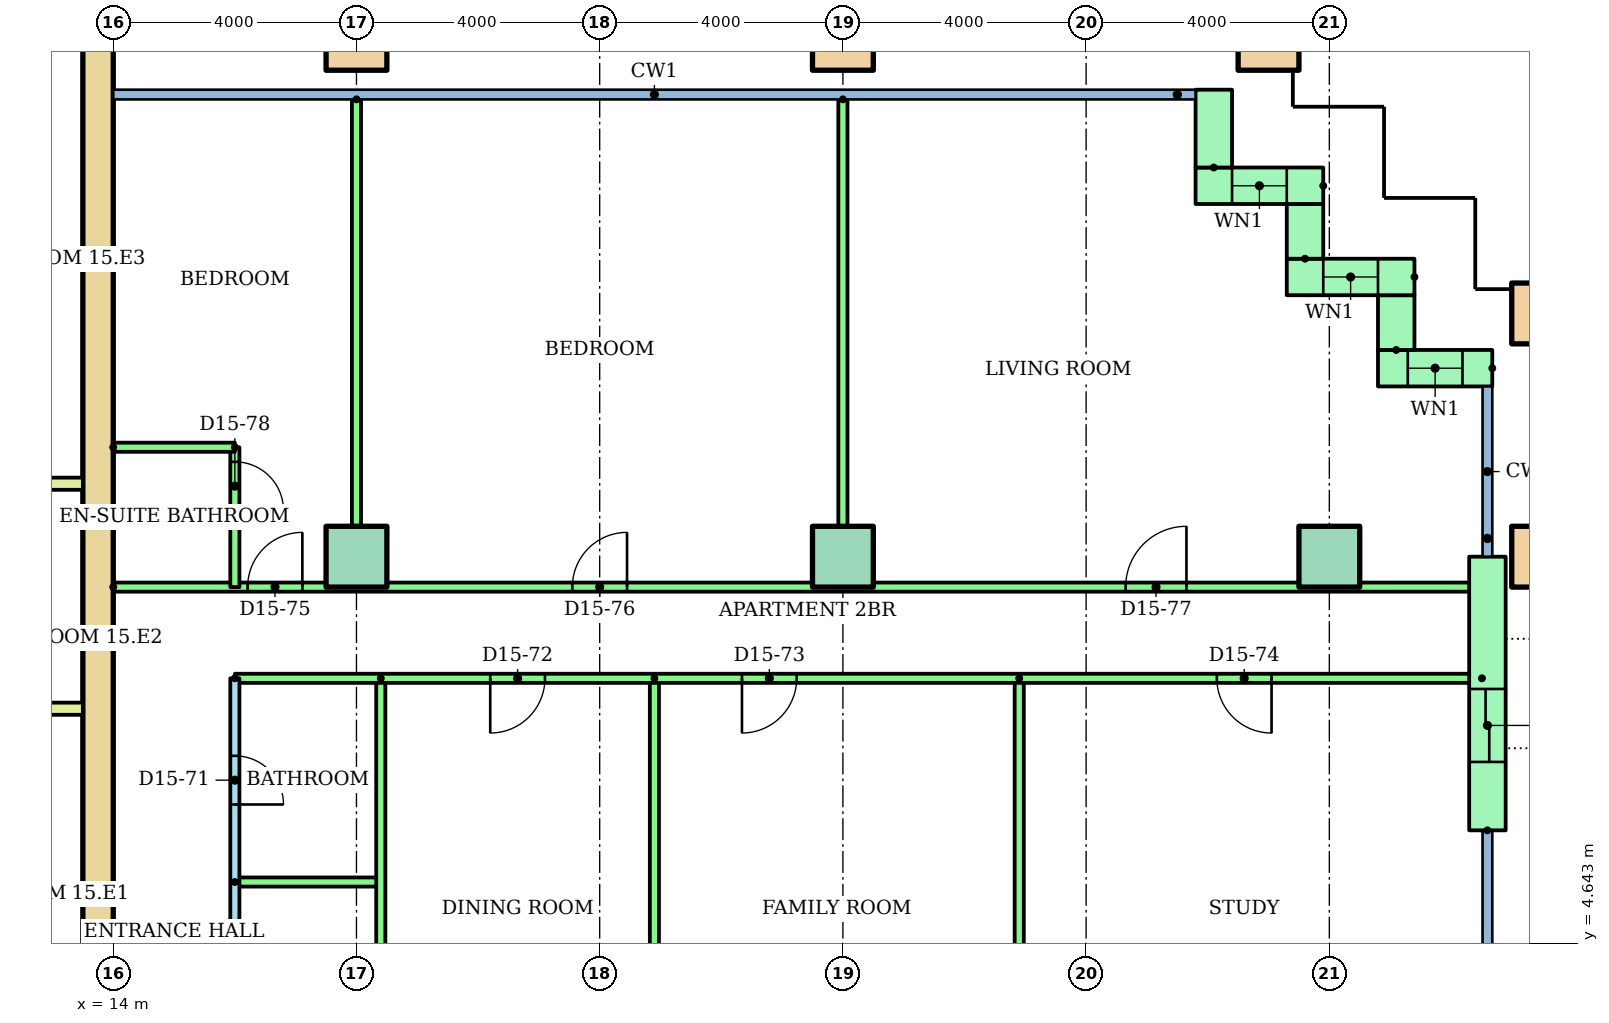
"""IFC4 building model, lengths in metres.
Left out: names, types, materials, properties, quantities, classifications, styles, units other than length and angle.
Written with IfcOpenShell. Run it as: python <this file> out.ifc"""

import sys

from ifc_helpers import new_model, si_unit, direction, frame, frame_2d, origin, origin_2d, place, context, subcontext, project, spatial, rectangle, hollow_rectangle, extrude, element, fill, save


model = new_model("IFC4")
c1 = context("Model", 3, precision=1e-05, world=origin(), true_north=direction((0.0, 1.0)))
c2 = subcontext(c1, "Body", "Model", "MODEL_VIEW")
j1 = project(units=[si_unit("LENGTHUNIT", "METRE"), si_unit("PLANEANGLEUNIT", "RADIAN")], contexts=[c1])
p1 = place(None, origin())
s1 = spatial("IfcSite", under=j1, at=p1, CompositionType="ELEMENT")
p2 = place(p1, origin())
s2 = spatial("IfcBuilding", under=s1, at=p2, CompositionType="ELEMENT")
p3 = place(p2, frame((0.0, 0.0, 57.6)))
s3 = spatial("IfcBuildingStorey", under=s2, at=p3, CompositionType="ELEMENT", Elevation=57.6)
for number, where in (
    (1, (18.0, 11.0, 0.0)),
    (2, (26.0, 11.0, 0.0)),
    (3, (34.0, 11.0, 0.0)),
):
    element("IfcColumn", number, at=place(p3, frame(where)), inside=s3, PredefinedType="COLUMN", context=c2, shape_type="SweptSolid", body=[
        extrude(rectangle(XDim=1.0, YDim=1.0, at=origin_2d()), origin(), (0.0, 0.0, 1.0), 3.2),
    ])
for number, where in (
    (4, (37.5, 11.0, 0.0)),
    (5, (37.5, 15.0, 0.0)),
    (6, (18.0, 19.5, 0.0)),
    (7, (26.0, 19.5, 0.0)),
    (8, (33.0, 19.5, 0.0)),
):
    element("IfcColumn", number, at=place(p3, frame(where)), inside=s3, PredefinedType="COLUMN", context=c2, shape_type="SweptSolid", body=[
        extrude(hollow_rectangle(XDim=1.0, YDim=1.0, WallThickness=0.05, at=origin_2d()), origin(), (0.0, 0.0, 1.0), 3.2),
    ])
p4 = place(p3, frame((36.68, 14.1, 0.0), z_axis=(0.0, 0.0, 1.0), x_axis=(-1.0, 0.0, 0.0)))
e9 = element("IfcWall", 9, at=p4, inside=s3, PredefinedType="STANDARD", context=c2, shape_type="SweptSolid", body=[
    extrude(rectangle(XDim=1.88, YDim=0.6, at=frame_2d((0.94, 0.0))), origin(), (0.0, 0.0, 1.0), 2.92),
])
p5 = place(p4, frame((0.49, 0.0, 0.9)))
e10 = element("IfcOpeningElement", 10, at=p5, cuts=e9, PredefinedType="OPENING", context=c2, shape_type="SweptSolid", body=[
    extrude(rectangle(XDim=0.9, YDim=1.5, at=frame_2d((0.45, 0.75))), frame((0.0, 0.31, 0.0), z_axis=(0.0, -1.0, 0.0), x_axis=(1.0, 0.0, 0.0)), (0.0, 0.0, 1.0), 0.62),
])
p6 = place(p3, frame((35.1, 14.4, 0.0), z_axis=(0.0, 0.0, 1.0), x_axis=(0.0, 1.0, 0.0)))
e11 = element("IfcWall", 11, at=p6, inside=s3, PredefinedType="STANDARD", context=c2, shape_type="SweptSolid", body=[
    extrude(rectangle(XDim=0.9, YDim=0.6, at=frame_2d((0.45, 0.0))), origin(), (0.0, 0.0, 1.0), 2.92),
])
p7 = place(p3, frame((35.4, 15.6, 0.0), z_axis=(0.0, 0.0, 1.0), x_axis=(-1.0, 0.0, 0.0)))
e12 = element("IfcWall", 12, at=p7, inside=s3, PredefinedType="STANDARD", context=c2, shape_type="SweptSolid", body=[
    extrude(rectangle(XDim=2.1, YDim=0.6, at=frame_2d((1.05, 0.0))), origin(), (0.0, 0.0, 1.0), 2.92),
])
p8 = place(p7, frame((0.6, 0.0, 0.9)))
e13 = element("IfcOpeningElement", 13, at=p8, cuts=e12, PredefinedType="OPENING", context=c2, shape_type="SweptSolid", body=[
    extrude(rectangle(XDim=0.9, YDim=1.5, at=frame_2d((0.45, 0.75))), frame((0.0, 0.31, 0.0), z_axis=(0.0, -1.0, 0.0), x_axis=(1.0, 0.0, 0.0)), (0.0, 0.0, 1.0), 0.62),
])
p9 = place(p3, frame((33.6, 15.9, 0.0), z_axis=(0.0, 0.0, 1.0), x_axis=(0.0, 1.0, 0.0)))
e14 = element("IfcWall", 14, at=p9, inside=s3, PredefinedType="STANDARD", context=c2, shape_type="SweptSolid", body=[
    extrude(rectangle(XDim=0.9, YDim=0.6, at=frame_2d((0.45, 0.0))), origin(), (0.0, 0.0, 1.0), 2.92),
])
p10 = place(p3, frame((33.9, 17.1, 0.0), z_axis=(0.0, 0.0, 1.0), x_axis=(-1.0, 0.0, 0.0)))
e15 = element("IfcWall", 15, at=p10, inside=s3, PredefinedType="STANDARD", context=c2, shape_type="SweptSolid", body=[
    extrude(rectangle(XDim=2.1, YDim=0.6, at=frame_2d((1.05, 0.0))), origin(), (0.0, 0.0, 1.0), 2.92),
])
p11 = place(p10, frame((0.6, 0.0, 0.9)))
e16 = element("IfcOpeningElement", 16, at=p11, cuts=e15, PredefinedType="OPENING", context=c2, shape_type="SweptSolid", body=[
    extrude(rectangle(XDim=0.9, YDim=1.5, at=frame_2d((0.45, 0.75))), frame((0.0, 0.31, 0.0), z_axis=(0.0, -1.0, 0.0), x_axis=(1.0, 0.0, 0.0)), (0.0, 0.0, 1.0), 0.62),
])
p12 = place(p3, frame((32.1, 17.4, 0.0), z_axis=(0.0, 0.0, 1.0), x_axis=(0.0, 1.0, 0.0)))
e17 = element("IfcWall", 17, at=p12, inside=s3, PredefinedType="STANDARD", context=c2, shape_type="SweptSolid", body=[
    extrude(rectangle(XDim=1.28, YDim=0.6, at=frame_2d((0.64, 0.0))), origin(), (0.0, 0.0, 1.0), 2.92),
])
p13 = place(p3, frame((36.6, 6.5, 0.0), z_axis=(0.0, 0.0, 1.0), x_axis=(0.0, 1.0, 0.0)))
e18 = element("IfcWall", 18, at=p13, inside=s3, PredefinedType="STANDARD", context=c2, shape_type="SweptSolid", body=[
    extrude(rectangle(XDim=4.5, YDim=0.6, at=frame_2d((2.25, 0.0))), origin(), (0.0, 0.0, 1.0), 2.92),
])
p14 = place(p13, frame((1.125, 0.0, 0.0)))
e19 = element("IfcOpeningElement", 19, at=p14, cuts=e18, PredefinedType="OPENING", context=c2, shape_type="SweptSolid", body=[
    extrude(rectangle(XDim=1.2, YDim=2.1, at=frame_2d((0.6, 1.05))), frame((0.0, 0.31, 0.0), z_axis=(0.0, -1.0, 0.0), x_axis=(1.0, 0.0, 0.0)), (0.0, 0.0, 1.0), 0.62),
])
p15 = place(p3, frame((13.75, 3.0, 0.0), z_axis=(0.0, 0.0, 1.0), x_axis=(0.0, 1.0, 0.0)))
e20 = element("IfcWall", 20, at=p15, inside=s3, PredefinedType="SHEAR", context=c2, shape_type="SweptSolid", body=[
    extrude(rectangle(XDim=17.0, YDim=0.5, at=frame_2d((8.5, 0.0))), origin(), (0.0, 0.0, 1.0), 2.92),
])
for number, where in (
    (21, (9.6, 8.5, 0.0)),
    (22, (9.6, 12.2, 0.0)),
):
    element("IfcWall", number, at=place(p3, frame(where)), inside=s3, PredefinedType="PARTITIONING", context=c2, shape_type="SweptSolid", body=[
        extrude(rectangle(XDim=3.9, YDim=0.2, at=frame_2d((1.95, 0.0))), origin(), (0.0, 0.0, 1.0), 2.92),
    ])
p16 = place(p3, frame((16.0, 9.0, 0.0), z_axis=(0.0, 0.0, 1.0), x_axis=(0.0, -1.0, 0.0)))
e23 = element("IfcWall", 23, at=p16, inside=s3, PredefinedType="PARTITIONING", context=c2, shape_type="SweptSolid", body=[
    extrude(rectangle(XDim=7.6, YDim=0.15, at=frame_2d((3.8, 0.0))), origin(), (0.0, 0.0, 1.0), 2.4),
])
p17 = place(p16, frame((5.025, 0.0, 0.0)))
e24 = element("IfcOpeningElement", 24, at=p17, cuts=e23, PredefinedType="OPENING", context=c2, shape_type="SweptSolid", body=[
    extrude(rectangle(XDim=0.9, YDim=2.1, at=frame_2d((0.45, 1.05))), frame((0.0, 0.085, 0.0), z_axis=(0.0, -1.0, 0.0), x_axis=(1.0, 0.0, 0.0)), (0.0, 0.0, 1.0), 0.17),
])
p18 = place(p16, frame((1.275, 0.0, 0.0)))
e25 = element("IfcOpeningElement", 25, at=p18, cuts=e23, PredefinedType="OPENING", context=c2, shape_type="SweptSolid", body=[
    extrude(rectangle(XDim=0.8, YDim=2.1, at=frame_2d((0.4, 1.05))), frame((0.0, 0.085, 0.0), z_axis=(0.0, -1.0, 0.0), x_axis=(1.0, 0.0, 0.0)), (0.0, 0.0, 1.0), 0.17),
])
p19 = place(p3, frame((16.0, 5.65, 0.0)))
e26 = element("IfcWall", 26, at=p19, inside=s3, PredefinedType="PARTITIONING", context=c2, shape_type="SweptSolid", body=[
    extrude(rectangle(XDim=2.4, YDim=0.15, at=frame_2d((1.2, 0.0))), origin(), (0.0, 0.0, 1.0), 2.4),
])
for number, where, z_axis, x_axis in (
    (27, (18.4, 9.0, 0.0), (0.0, 0.0, 1.0), (0.0, -1.0, 0.0)),
    (28, (22.9, 9.0, 0.0), (0.0, 0.0, 1.0), (0.0, -1.0, 0.0)),
    (29, (28.9, 9.0, 0.0), (0.0, 0.0, 1.0), (0.0, -1.0, 0.0)),
):
    element("IfcWall", number, at=place(p3, frame(where, z_axis=z_axis, x_axis=x_axis)), inside=s3, PredefinedType="PARTITIONING", context=c2, shape_type="SweptSolid", body=[
        extrude(rectangle(XDim=7.6, YDim=0.15, at=frame_2d((3.8, 0.0))), origin(), (0.0, 0.0, 1.0), 2.4),
    ])
p20 = place(p3, frame((36.51, 9.0, 0.0), z_axis=(0.0, 0.0, 1.0), x_axis=(-1.0, 0.0, 0.0)))
e30 = element("IfcWall", 30, at=p20, inside=s3, PredefinedType="PARTITIONING", context=c2, shape_type="SweptSolid", body=[
    extrude(rectangle(XDim=20.51, YDim=0.15, at=frame_2d((10.255, 0.0))), origin(), (0.0, 0.0, 1.0), 2.4),
])
p21 = place(p20, frame((15.41, 0.0, 0.0)))
e31 = element("IfcOpeningElement", 31, at=p21, cuts=e30, PredefinedType="OPENING", context=c2, shape_type="SweptSolid", body=[
    extrude(rectangle(XDim=0.9, YDim=2.1, at=frame_2d((0.45, 1.05))), frame((0.0, 0.085, 0.0), z_axis=(0.0, -1.0, 0.0), x_axis=(1.0, 0.0, 0.0)), (0.0, 0.0, 1.0), 0.17),
])
p22 = place(p20, frame((11.27, 0.0, 0.0)))
e32 = element("IfcOpeningElement", 32, at=p22, cuts=e30, PredefinedType="OPENING", context=c2, shape_type="SweptSolid", body=[
    extrude(rectangle(XDim=0.9, YDim=2.1, at=frame_2d((0.45, 1.05))), frame((0.0, 0.085, 0.0), z_axis=(0.0, -1.0, 0.0), x_axis=(1.0, 0.0, 0.0)), (0.0, 0.0, 1.0), 0.17),
])
p23 = place(p20, frame((3.46, 0.0, 0.0)))
e33 = element("IfcOpeningElement", 33, at=p23, cuts=e30, PredefinedType="OPENING", context=c2, shape_type="SweptSolid", body=[
    extrude(rectangle(XDim=0.9, YDim=2.1, at=frame_2d((0.45, 1.05))), frame((0.0, 0.085, 0.0), z_axis=(0.0, -1.0, 0.0), x_axis=(1.0, 0.0, 0.0)), (0.0, 0.0, 1.0), 0.17),
])
p24 = place(p3, frame((14.0, 10.5, 0.0)))
e34 = element("IfcWall", 34, at=p24, inside=s3, PredefinedType="PARTITIONING", context=c2, shape_type="SweptSolid", body=[
    extrude(rectangle(XDim=22.51, YDim=0.15, at=frame_2d((11.255, 0.0))), origin(), (0.0, 0.0, 1.0), 2.4),
])
p25 = place(p24, frame((2.21, 0.0, 0.0)))
e35 = element("IfcOpeningElement", 35, at=p25, cuts=e34, PredefinedType="OPENING", context=c2, shape_type="SweptSolid", body=[
    extrude(rectangle(XDim=0.9, YDim=2.1, at=frame_2d((0.45, 1.05))), frame((0.0, 0.085, 0.0), z_axis=(0.0, -1.0, 0.0), x_axis=(1.0, 0.0, 0.0)), (0.0, 0.0, 1.0), 0.17),
])
p26 = place(p24, frame((7.55, 0.0, 0.0)))
e36 = element("IfcOpeningElement", 36, at=p26, cuts=e34, PredefinedType="OPENING", context=c2, shape_type="SweptSolid", body=[
    extrude(rectangle(XDim=0.9, YDim=2.1, at=frame_2d((0.45, 1.05))), frame((0.0, 0.085, 0.0), z_axis=(0.0, -1.0, 0.0), x_axis=(1.0, 0.0, 0.0)), (0.0, 0.0, 1.0), 0.17),
])
p27 = place(p24, frame((16.65, 0.0, 0.0)))
e37 = element("IfcOpeningElement", 37, at=p27, cuts=e34, PredefinedType="OPENING", context=c2, shape_type="SweptSolid", body=[
    extrude(rectangle(XDim=1.0, YDim=2.1, at=frame_2d((0.5, 1.05))), frame((0.0, 0.085, 0.0), z_axis=(0.0, -1.0, 0.0), x_axis=(1.0, 0.0, 0.0)), (0.0, 0.0, 1.0), 0.17),
])
for number, where, z_axis, x_axis in (
    (38, (18.0, 18.521, 0.0), (0.0, 0.0, 1.0), (0.0, -1.0, 0.0)),
    (39, (26.0, 18.521, 0.0), (0.0, 0.0, 1.0), (0.0, -1.0, 0.0)),
):
    element("IfcWall", number, at=place(p3, frame(where, z_axis=z_axis, x_axis=x_axis)), inside=s3, PredefinedType="PARTITIONING", context=c2, shape_type="SweptSolid", body=[
        extrude(rectangle(XDim=8.021, YDim=0.15, at=frame_2d((4.01, 0.0))), origin(), (0.0, 0.0, 1.0), 2.4),
    ])
p28 = place(p3, frame((16.0, 12.8, 0.0), z_axis=(0.0, 0.0, 1.0), x_axis=(0.0, -1.0, 0.0)))
e40 = element("IfcWall", 40, at=p28, inside=s3, PredefinedType="PARTITIONING", context=c2, shape_type="SweptSolid", body=[
    extrude(rectangle(XDim=2.3, YDim=0.15, at=frame_2d((1.15, 0.0))), origin(), (0.0, 0.0, 1.0), 2.4),
])
p29 = place(p28, frame((0.24, 0.0, 0.0)))
e41 = element("IfcOpeningElement", 41, at=p29, cuts=e40, PredefinedType="OPENING", context=c2, shape_type="SweptSolid", body=[
    extrude(rectangle(XDim=0.8, YDim=2.1, at=frame_2d((0.4, 1.05))), frame((0.0, 0.085, 0.0), z_axis=(0.0, -1.0, 0.0), x_axis=(1.0, 0.0, 0.0)), (0.0, 0.0, 1.0), 0.17),
])
p30 = place(p3, frame((14.0, 12.8, 0.0)))
e42 = element("IfcWall", 42, at=p30, inside=s3, PredefinedType="PARTITIONING", context=c2, shape_type="SweptSolid", body=[
    extrude(rectangle(XDim=2.0, YDim=0.15, at=frame_2d((1.0, 0.0))), origin(), (0.0, 0.0, 1.0), 2.4),
])
p31 = place(p5, origin())
e43 = element("IfcWindow", 43, at=p31, inside=s3, PartitioningType="SINGLE_PANEL", PredefinedType="WINDOW", context=c2, shape_type="SweptSolid", body=[
    extrude(rectangle(XDim=0.9, YDim=1.5, at=frame_2d((0.45, 0.75))), frame((0.0, 0.03, 0.0), z_axis=(0.0, -1.0, 0.0), x_axis=(1.0, 0.0, 0.0)), (0.0, 0.0, 1.0), 0.06),
])
fill(e10, e43)
p32 = place(p8, origin())
e44 = element("IfcWindow", 44, at=p32, inside=s3, PartitioningType="SINGLE_PANEL", PredefinedType="WINDOW", context=c2, shape_type="SweptSolid", body=[
    extrude(rectangle(XDim=0.9, YDim=1.5, at=frame_2d((0.45, 0.75))), frame((0.0, 0.03, 0.0), z_axis=(0.0, -1.0, 0.0), x_axis=(1.0, 0.0, 0.0)), (0.0, 0.0, 1.0), 0.06),
])
fill(e13, e44)
p33 = place(p11, origin())
e45 = element("IfcWindow", 45, at=p33, inside=s3, PartitioningType="SINGLE_PANEL", PredefinedType="WINDOW", context=c2, shape_type="SweptSolid", body=[
    extrude(rectangle(XDim=0.9, YDim=1.5, at=frame_2d((0.45, 0.75))), frame((0.0, 0.03, 0.0), z_axis=(0.0, -1.0, 0.0), x_axis=(1.0, 0.0, 0.0)), (0.0, 0.0, 1.0), 0.06),
])
fill(e16, e45)
p34 = place(p18, origin())
e46 = element("IfcDoor", 46, at=p34, inside=s3, OperationType="SINGLE_SWING_RIGHT", PredefinedType="DOOR", context=c2, shape_type="SweptSolid", body=[
    extrude(rectangle(XDim=0.8, YDim=2.1, at=frame_2d((0.4, 1.05))), frame((0.0, 0.025, 0.0), z_axis=(0.0, -1.0, 0.0), x_axis=(1.0, 0.0, 0.0)), (0.0, 0.0, 1.0), 0.05),
])
fill(e25, e46)
p35 = place(p21, origin())
e47 = element("IfcDoor", 47, at=p35, inside=s3, OperationType="SINGLE_SWING_RIGHT", PredefinedType="DOOR", context=c2, shape_type="SweptSolid", body=[
    extrude(rectangle(XDim=0.9, YDim=2.1, at=frame_2d((0.45, 1.05))), frame((0.0, 0.025, 0.0), z_axis=(0.0, -1.0, 0.0), x_axis=(1.0, 0.0, 0.0)), (0.0, 0.0, 1.0), 0.05),
])
fill(e31, e47)
p36 = place(p22, origin())
e48 = element("IfcDoor", 48, at=p36, inside=s3, OperationType="SINGLE_SWING_RIGHT", PredefinedType="DOOR", context=c2, shape_type="SweptSolid", body=[
    extrude(rectangle(XDim=0.9, YDim=2.1, at=frame_2d((0.45, 1.05))), frame((0.0, 0.025, 0.0), z_axis=(0.0, -1.0, 0.0), x_axis=(1.0, 0.0, 0.0)), (0.0, 0.0, 1.0), 0.05),
])
fill(e32, e48)
p37 = place(p23, origin())
e49 = element("IfcDoor", 49, at=p37, inside=s3, OperationType="SINGLE_SWING_LEFT", PredefinedType="DOOR", context=c2, shape_type="SweptSolid", body=[
    extrude(rectangle(XDim=0.9, YDim=2.1, at=frame_2d((0.45, 1.05))), frame((0.0, 0.025, 0.0), z_axis=(0.0, -1.0, 0.0), x_axis=(1.0, 0.0, 0.0)), (0.0, 0.0, 1.0), 0.05),
])
fill(e33, e49)
p38 = place(p25, origin())
e50 = element("IfcDoor", 50, at=p38, inside=s3, OperationType="SINGLE_SWING_RIGHT", PredefinedType="DOOR", context=c2, shape_type="SweptSolid", body=[
    extrude(rectangle(XDim=0.9, YDim=2.1, at=frame_2d((0.45, 1.05))), frame((0.0, 0.025, 0.0), z_axis=(0.0, -1.0, 0.0), x_axis=(1.0, 0.0, 0.0)), (0.0, 0.0, 1.0), 0.05),
])
fill(e35, e50)
p39 = place(p26, origin())
e51 = element("IfcDoor", 51, at=p39, inside=s3, OperationType="SINGLE_SWING_RIGHT", PredefinedType="DOOR", context=c2, shape_type="SweptSolid", body=[
    extrude(rectangle(XDim=0.9, YDim=2.1, at=frame_2d((0.45, 1.05))), frame((0.0, 0.025, 0.0), z_axis=(0.0, -1.0, 0.0), x_axis=(1.0, 0.0, 0.0)), (0.0, 0.0, 1.0), 0.05),
])
fill(e36, e51)
p40 = place(p27, origin())
e52 = element("IfcDoor", 52, at=p40, inside=s3, OperationType="SINGLE_SWING_RIGHT", PredefinedType="DOOR", context=c2, shape_type="SweptSolid", body=[
    extrude(rectangle(XDim=1.0, YDim=2.1, at=frame_2d((0.5, 1.05))), frame((0.0, 0.025, 0.0), z_axis=(0.0, -1.0, 0.0), x_axis=(1.0, 0.0, 0.0)), (0.0, 0.0, 1.0), 0.05),
])
fill(e37, e52)
p41 = place(p29, origin())
e53 = element("IfcDoor", 53, at=p41, inside=s3, OperationType="SINGLE_SWING_RIGHT", PredefinedType="DOOR", context=c2, shape_type="SweptSolid", body=[
    extrude(rectangle(XDim=0.8, YDim=2.1, at=frame_2d((0.4, 1.05))), frame((0.0, 0.025, 0.0), z_axis=(0.0, -1.0, 0.0), x_axis=(1.0, 0.0, 0.0)), (0.0, 0.0, 1.0), 0.05),
])
fill(e41, e53)
p42 = place(p14, origin())
e54 = element("IfcDoor", 54, at=p42, inside=s3, OperationType="SLIDING_TO_LEFT", PredefinedType="DOOR", context=c2, shape_type="SweptSolid", body=[
    extrude(rectangle(XDim=1.2, YDim=2.1, at=frame_2d((0.6, 1.05))), frame((0.0, 0.025, 0.0), z_axis=(0.0, -1.0, 0.0), x_axis=(1.0, 0.0, 0.0)), (0.0, 0.0, 1.0), 0.05),
])
fill(e19, e54)
save(model, sys.argv[1])
